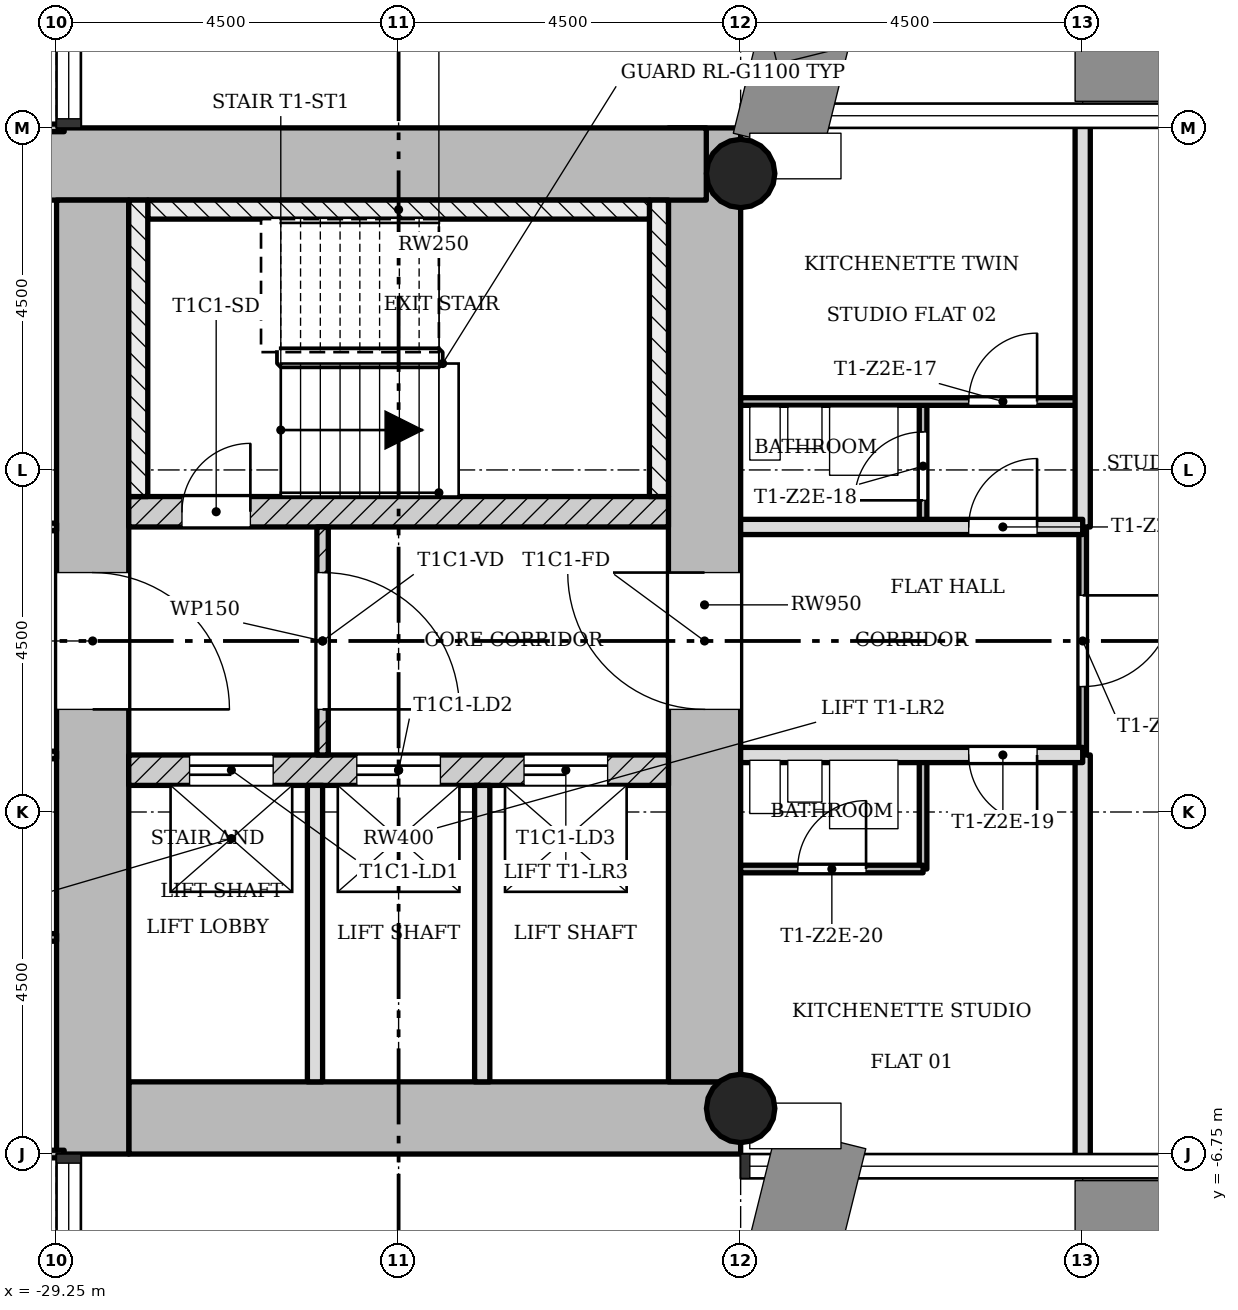
"""IFC4 building model, lengths in metres.
Left out: names, types, materials, properties, quantities, classifications, styles, units other than length and angle.
Written with IfcOpenShell. Run it as: python <this file> out.ifc"""

import sys

from ifc_helpers import new_model, si_unit, direction, frame, frame_2d, origin, origin_2d, place, context, subcontext, project, spatial, rectangle, hollow_circle, extrude, element, fill, save


model = new_model("IFC4")
c1 = context("Model", 3, precision=1e-05, world=origin(), true_north=direction((0.0, 1.0)))
c2 = subcontext(c1, "Body", "Model", "MODEL_VIEW")
j1 = project(units=[si_unit("LENGTHUNIT", "METRE"), si_unit("PLANEANGLEUNIT", "RADIAN")], contexts=[c1])
p1 = place(None, origin())
s1 = spatial("IfcSite", under=j1, at=p1, CompositionType="ELEMENT")
p2 = place(p1, origin())
s2 = spatial("IfcBuilding", under=s1, at=p2, CompositionType="ELEMENT")
p3 = place(p2, frame((0.0, 0.0, 100.4)))
s3 = spatial("IfcBuildingStorey", under=s2, at=p3, CompositionType="ELEMENT", Elevation=100.4)
p4 = place(p3, frame((-28.3, -6.275, 0.0), z_axis=(0.0, 0.0, 1.0), x_axis=(1.0, 0.0, 0.0)))
e1 = element("IfcWall", 1, at=p4, inside=s3, PredefinedType="SHEAR", context=c2, shape_type="SweptSolid", body=[
    extrude(rectangle(XDim=8.05, YDim=0.95, at=frame_2d((4.025, 0.0))), origin(), (0.0, 0.0, 1.0), 3.4),
])
p5 = place(p3, frame((-20.725, -5.8, 0.0), z_axis=(0.0, 0.0, 1.0), x_axis=(0.0, 1.0, 0.0)))
e2 = element("IfcWall", 2, at=p5, inside=s3, PredefinedType="SHEAR", context=c2, shape_type="SweptSolid", body=[
    extrude(rectangle(XDim=12.55, YDim=0.95, at=frame_2d((6.275, 0.0))), origin(), (0.0, 0.0, 1.0), 3.4),
])
p6 = place(p5, frame((4.9, 0.0, 0.0)))
e3 = element("IfcOpeningElement", 3, at=p6, cuts=e2, PredefinedType="OPENING", context=c2, shape_type="SweptSolid", body=[
    extrude(rectangle(XDim=1.8, YDim=2.1, at=frame_2d((0.9, 1.05))), frame((0.0, 0.485, 0.0), z_axis=(0.0, -1.0, 0.0), x_axis=(1.0, 0.0, 0.0)), (0.0, 0.0, 1.0), 0.97),
])
p7 = place(p3, frame((-20.702, 6.275, 0.0), z_axis=(0.0, 0.0, 1.0), x_axis=(-1.0, 0.0, 0.0)))
e4 = element("IfcWall", 4, at=p7, inside=s3, PredefinedType="SHEAR", context=c2, shape_type="SweptSolid", body=[
    extrude(rectangle(XDim=8.696, YDim=0.95, at=frame_2d((4.348, 0.0))), origin(), (0.0, 0.0, 1.0), 3.4),
])
p8 = place(p3, frame((-28.775, 5.8, 0.0), z_axis=(0.0, 0.0, 1.0), x_axis=(0.0, -1.0, 0.0)))
e5 = element("IfcWall", 5, at=p8, inside=s3, PredefinedType="SHEAR", context=c2, shape_type="SweptSolid", body=[
    extrude(rectangle(XDim=12.55, YDim=0.95, at=frame_2d((6.275, 0.0))), origin(), (0.0, 0.0, 1.0), 3.4),
])
p9 = place(p8, frame((4.9, 0.0, 0.0)))
e6 = element("IfcOpeningElement", 6, at=p9, cuts=e5, PredefinedType="OPENING", context=c2, shape_type="SweptSolid", body=[
    extrude(rectangle(XDim=1.8, YDim=2.1, at=frame_2d((0.9, 1.05))), frame((0.0, 0.485, 0.0), z_axis=(0.0, -1.0, 0.0), x_axis=(1.0, 0.0, 0.0)), (0.0, 0.0, 1.0), 0.97),
])
p10 = place(p3, frame((-28.3, -1.7, 0.0), z_axis=(0.0, 0.0, 1.0), x_axis=(1.0, 0.0, 0.0)))
e7 = element("IfcWall", 7, at=p10, inside=s3, PredefinedType="SHEAR", context=c2, shape_type="SweptSolid", body=[
    extrude(rectangle(XDim=7.1, YDim=0.4, at=frame_2d((3.55, 0.0))), origin(), (0.0, 0.0, 1.0), 3.4),
])
p11 = place(p10, frame((0.8, 0.0, 0.0)))
e8 = element("IfcOpeningElement", 8, at=p11, cuts=e7, PredefinedType="OPENING", context=c2, shape_type="SweptSolid", body=[
    extrude(rectangle(XDim=1.1, YDim=2.1, at=frame_2d((0.55, 1.05))), frame((0.0, 0.21, 0.0), z_axis=(0.0, -1.0, 0.0), x_axis=(1.0, 0.0, 0.0)), (0.0, 0.0, 1.0), 0.42),
])
p12 = place(p10, frame((3.0, 0.0, 0.0)))
e9 = element("IfcOpeningElement", 9, at=p12, cuts=e7, PredefinedType="OPENING", context=c2, shape_type="SweptSolid", body=[
    extrude(rectangle(XDim=1.1, YDim=2.1, at=frame_2d((0.55, 1.05))), frame((0.0, 0.21, 0.0), z_axis=(0.0, -1.0, 0.0), x_axis=(1.0, 0.0, 0.0)), (0.0, 0.0, 1.0), 0.42),
])
p13 = place(p10, frame((5.2, 0.0, 0.0)))
e10 = element("IfcOpeningElement", 10, at=p13, cuts=e7, PredefinedType="OPENING", context=c2, shape_type="SweptSolid", body=[
    extrude(rectangle(XDim=1.1, YDim=2.1, at=frame_2d((0.55, 1.05))), frame((0.0, 0.21, 0.0), z_axis=(0.0, -1.0, 0.0), x_axis=(1.0, 0.0, 0.0)), (0.0, 0.0, 1.0), 0.42),
])
p14 = place(p3, frame((-28.3, 1.7, 0.0), z_axis=(0.0, 0.0, 1.0), x_axis=(1.0, 0.0, 0.0)))
e11 = element("IfcWall", 11, at=p14, inside=s3, PredefinedType="SHEAR", context=c2, shape_type="SweptSolid", body=[
    extrude(rectangle(XDim=7.1, YDim=0.4, at=frame_2d((3.55, 0.0))), origin(), (0.0, 0.0, 1.0), 3.4),
])
p15 = place(p14, frame((0.7, 0.0, 0.0)))
e12 = element("IfcOpeningElement", 12, at=p15, cuts=e11, PredefinedType="OPENING", context=c2, shape_type="SweptSolid", body=[
    extrude(rectangle(XDim=0.9, YDim=2.1, at=frame_2d((0.45, 1.05))), frame((0.0, 0.21, 0.0), z_axis=(0.0, -1.0, 0.0), x_axis=(1.0, 0.0, 0.0)), (0.0, 0.0, 1.0), 0.42),
])
for number, where, z_axis, x_axis in (
    (13, (-20.25, -6.15, 0.0), (0.0, 0.0, 1.0), (1.0, 0.0, 0.0)),
    (14, (-20.25, 6.15, 0.0), (0.0, 0.0, 1.0), (1.0, 0.0, 0.0)),
):
    element("IfcColumn", number, at=place(p3, frame(where, z_axis=z_axis, x_axis=x_axis)), inside=s3, PredefinedType="COLUMN", context=c2, shape_type="SweptSolid", body=[
        extrude(hollow_circle(Radius=0.45, WallThickness=0.032, at=origin_2d()), origin(), (0.0, 0.0, 1.0), 3.4),
    ])
p16 = place(p3, frame((-25.75, -1.5, 0.0), z_axis=(0.0, 0.0, 1.0), x_axis=(0.0, 1.0, 0.0)))
e15 = element("IfcWall", 15, at=p16, inside=s3, PredefinedType="PARTITIONING", context=c2, shape_type="SweptSolid", body=[
    extrude(rectangle(XDim=3.0, YDim=0.15, at=frame_2d((1.5, 0.0))), origin(), (0.0, 0.0, 1.0), 3.0),
])
p17 = place(p16, frame((0.6, 0.0, 0.0)))
e16 = element("IfcOpeningElement", 16, at=p17, cuts=e15, PredefinedType="OPENING", context=c2, shape_type="SweptSolid", body=[
    extrude(rectangle(XDim=1.8, YDim=2.1, at=frame_2d((0.9, 1.05))), frame((0.0, 0.085, 0.0), z_axis=(0.0, -1.0, 0.0), x_axis=(1.0, 0.0, 0.0)), (0.0, 0.0, 1.0), 0.17),
])
for number, where, z_axis, x_axis in (
    (17, (-25.85, -5.8, 0.0), (0.0, 0.0, 1.0), (0.0, 1.0, 0.0)),
    (18, (-23.65, -5.8, 0.0), (0.0, 0.0, 1.0), (0.0, 1.0, 0.0)),
):
    element("IfcWall", number, at=place(p3, frame(where, z_axis=z_axis, x_axis=x_axis)), inside=s3, PredefinedType="SOLIDWALL", context=c2, shape_type="SweptSolid", body=[
        extrude(rectangle(XDim=3.9, YDim=0.2, at=frame_2d((1.95, 0.0))), origin(), (0.0, 0.0, 1.0), 3.0),
    ])
p18 = place(p3, frame((-17.85, -3.0, 0.0), z_axis=(0.0, 0.0, 1.0), x_axis=(0.0, 1.0, 0.0)))
e19 = element("IfcWall", 19, at=p18, inside=s3, PredefinedType="PARTITIONING", context=c2, shape_type="SweptSolid", body=[
    extrude(rectangle(XDim=1.5, YDim=0.1, at=frame_2d((0.75, 0.0))), origin(), (0.0, 0.0, 1.0), 3.0),
])
p19 = place(p3, frame((-17.85, 1.5, 0.0), z_axis=(0.0, 0.0, 1.0), x_axis=(0.0, 1.0, 0.0)))
e20 = element("IfcWall", 20, at=p19, inside=s3, PredefinedType="PARTITIONING", context=c2, shape_type="SweptSolid", body=[
    extrude(rectangle(XDim=1.65, YDim=0.1, at=frame_2d((0.825, 0.0))), origin(), (0.0, 0.0, 1.0), 3.0),
])
p20 = place(p19, frame((0.35, 0.0, 0.0)))
e21 = element("IfcOpeningElement", 21, at=p20, cuts=e20, PredefinedType="OPENING", context=c2, shape_type="SweptSolid", body=[
    extrude(rectangle(XDim=0.9, YDim=2.1, at=frame_2d((0.45, 1.05))), frame((0.0, 0.06, 0.0), z_axis=(0.0, -1.0, 0.0), x_axis=(1.0, 0.0, 0.0)), (0.0, 0.0, 1.0), 0.12),
])
p21 = place(p3, frame((-15.75, -1.5, 0.0), z_axis=(0.0, 0.0, 1.0), x_axis=(0.0, 1.0, 0.0)))
e22 = element("IfcWall", 22, at=p21, inside=s3, PredefinedType="PARTITIONING", context=c2, shape_type="SweptSolid", body=[
    extrude(rectangle(XDim=3.0, YDim=0.1, at=frame_2d((1.5, 0.0))), origin(), (0.0, 0.0, 1.0), 3.0),
])
p22 = place(p21, frame((0.9, 0.0, 0.0)))
e23 = element("IfcOpeningElement", 23, at=p22, cuts=e22, PredefinedType="OPENING", context=c2, shape_type="SweptSolid", body=[
    extrude(rectangle(XDim=1.2, YDim=2.1, at=frame_2d((0.6, 1.05))), frame((0.0, 0.06, 0.0), z_axis=(0.0, -1.0, 0.0), x_axis=(1.0, 0.0, 0.0)), (0.0, 0.0, 1.0), 0.12),
])
for number, where, z_axis, x_axis in (
    (24, (-15.75, -6.85, 0.0), (0.0, 0.0, 1.0), (0.0, 1.0, 0.0)),
    (25, (-15.75, 1.5, 0.0), (0.0, 0.0, 1.0), (0.0, 1.0, 0.0)),
):
    element("IfcWall", number, at=place(p3, frame(where, z_axis=z_axis, x_axis=x_axis)), inside=s3, PredefinedType="SOLIDWALL", context=c2, shape_type="SweptSolid", body=[
        extrude(rectangle(XDim=5.35, YDim=0.2, at=frame_2d((2.675, 0.0))), origin(), (0.0, 0.0, 1.0), 3.0),
    ])
p23 = place(p3, frame((-35.1, -6.75, 0.0), z_axis=(0.0, 0.0, 1.0), x_axis=(1.0, 0.0, 0.0)))
e26 = element("IfcWall", 26, at=p23, inside=s3, PredefinedType="PARTITIONING", context=c2, shape_type="SweptSolid", body=[
    extrude(rectangle(XDim=5.95, YDim=0.1, at=frame_2d((2.975, 0.0))), origin(), (0.0, 0.0, 1.0), 3.0),
])
p24 = place(p3, frame((-35.1, -3.9, 0.0), z_axis=(0.0, 0.0, 1.0), x_axis=(1.0, 0.0, 0.0)))
e27 = element("IfcWall", 27, at=p24, inside=s3, PredefinedType="PARTITIONING", context=c2, shape_type="SweptSolid", body=[
    extrude(rectangle(XDim=5.85, YDim=0.1, at=frame_2d((2.925, 0.0))), origin(), (0.0, 0.0, 1.0), 3.0),
])
p25 = place(p3, frame((-20.25, -3.0, 0.0), z_axis=(0.0, 0.0, 1.0), x_axis=(1.0, 0.0, 0.0)))
e28 = element("IfcWall", 28, at=p25, inside=s3, PredefinedType="PARTITIONING", context=c2, shape_type="SweptSolid", body=[
    extrude(rectangle(XDim=2.4, YDim=0.1, at=frame_2d((1.2, 0.0))), origin(), (0.0, 0.0, 1.0), 3.0),
])
p26 = place(p25, frame((0.75, 0.0, 0.0)))
e29 = element("IfcOpeningElement", 29, at=p26, cuts=e28, PredefinedType="OPENING", context=c2, shape_type="SweptSolid", body=[
    extrude(rectangle(XDim=0.9, YDim=2.1, at=frame_2d((0.45, 1.05))), frame((0.0, 0.06, 0.0), z_axis=(0.0, -1.0, 0.0), x_axis=(1.0, 0.0, 0.0)), (0.0, 0.0, 1.0), 0.12),
])
p27 = place(p3, frame((-35.1, -1.5, 0.0), z_axis=(0.0, 0.0, 1.0), x_axis=(1.0, 0.0, 0.0)))
e30 = element("IfcWall", 30, at=p27, inside=s3, PredefinedType="PARTITIONING", context=c2, shape_type="SweptSolid", body=[
    extrude(rectangle(XDim=5.85, YDim=0.1, at=frame_2d((2.925, 0.0))), origin(), (0.0, 0.0, 1.0), 3.0),
])
p28 = place(p27, frame((3.375, 0.0, 0.0)))
e31 = element("IfcOpeningElement", 31, at=p28, cuts=e30, PredefinedType="OPENING", context=c2, shape_type="SweptSolid", body=[
    extrude(rectangle(XDim=0.9, YDim=2.1, at=frame_2d((0.45, 1.05))), frame((0.0, 0.06, 0.0), z_axis=(0.0, -1.0, 0.0), x_axis=(1.0, 0.0, 0.0)), (0.0, 0.0, 1.0), 0.12),
])
p29 = place(p3, frame((-20.25, -1.5, 0.0), z_axis=(0.0, 0.0, 1.0), x_axis=(1.0, 0.0, 0.0)))
e32 = element("IfcWall", 32, at=p29, inside=s3, PredefinedType="SOLIDWALL", context=c2, shape_type="SweptSolid", body=[
    extrude(rectangle(XDim=4.5, YDim=0.2, at=frame_2d((2.25, 0.0))), origin(), (0.0, 0.0, 1.0), 3.0),
])
p30 = place(p29, frame((3.0, 0.0, 0.0)))
e33 = element("IfcOpeningElement", 33, at=p30, cuts=e32, PredefinedType="OPENING", context=c2, shape_type="SweptSolid", body=[
    extrude(rectangle(XDim=0.9, YDim=2.1, at=frame_2d((0.45, 1.05))), frame((0.0, 0.11, 0.0), z_axis=(0.0, -1.0, 0.0), x_axis=(1.0, 0.0, 0.0)), (0.0, 0.0, 1.0), 0.22),
])
p31 = place(p3, frame((-35.1, 1.5, 0.0), z_axis=(0.0, 0.0, 1.0), x_axis=(1.0, 0.0, 0.0)))
e34 = element("IfcWall", 34, at=p31, inside=s3, PredefinedType="PARTITIONING", context=c2, shape_type="SweptSolid", body=[
    extrude(rectangle(XDim=5.85, YDim=0.1, at=frame_2d((2.925, 0.0))), origin(), (0.0, 0.0, 1.0), 3.0),
])
p32 = place(p31, frame((3.675, 0.0, 0.0)))
e35 = element("IfcOpeningElement", 35, at=p32, cuts=e34, PredefinedType="OPENING", context=c2, shape_type="SweptSolid", body=[
    extrude(rectangle(XDim=0.9, YDim=2.1, at=frame_2d((0.45, 1.05))), frame((0.0, 0.06, 0.0), z_axis=(0.0, -1.0, 0.0), x_axis=(1.0, 0.0, 0.0)), (0.0, 0.0, 1.0), 0.12),
])
p33 = place(p3, frame((-20.25, 1.5, 0.0), z_axis=(0.0, 0.0, 1.0), x_axis=(1.0, 0.0, 0.0)))
e36 = element("IfcWall", 36, at=p33, inside=s3, PredefinedType="SOLIDWALL", context=c2, shape_type="SweptSolid", body=[
    extrude(rectangle(XDim=4.5, YDim=0.2, at=frame_2d((2.25, 0.0))), origin(), (0.0, 0.0, 1.0), 3.0),
])
p34 = place(p33, frame((3.0, 0.0, 0.0)))
e37 = element("IfcOpeningElement", 37, at=p34, cuts=e36, PredefinedType="OPENING", context=c2, shape_type="SweptSolid", body=[
    extrude(rectangle(XDim=0.9, YDim=2.1, at=frame_2d((0.45, 1.05))), frame((0.0, 0.11, 0.0), z_axis=(0.0, -1.0, 0.0), x_axis=(1.0, 0.0, 0.0)), (0.0, 0.0, 1.0), 0.22),
])
p35 = place(p3, frame((-20.25, 3.15, 0.0), z_axis=(0.0, 0.0, 1.0), x_axis=(1.0, 0.0, 0.0)))
e38 = element("IfcWall", 38, at=p35, inside=s3, PredefinedType="PARTITIONING", context=c2, shape_type="SweptSolid", body=[
    extrude(rectangle(XDim=4.5, YDim=0.1, at=frame_2d((2.25, 0.0))), origin(), (0.0, 0.0, 1.0), 3.0),
])
p36 = place(p35, frame((3.0, 0.0, 0.0)))
e39 = element("IfcOpeningElement", 39, at=p36, cuts=e38, PredefinedType="OPENING", context=c2, shape_type="SweptSolid", body=[
    extrude(rectangle(XDim=0.9, YDim=2.1, at=frame_2d((0.45, 1.05))), frame((0.0, 0.06, 0.0), z_axis=(0.0, -1.0, 0.0), x_axis=(1.0, 0.0, 0.0)), (0.0, 0.0, 1.0), 0.12),
])
p37 = place(p3, frame((-35.1, 6.75, 0.0), z_axis=(0.0, 0.0, 1.0), x_axis=(1.0, 0.0, 0.0)))
e40 = element("IfcWall", 40, at=p37, inside=s3, PredefinedType="PARTITIONING", context=c2, shape_type="SweptSolid", body=[
    extrude(rectangle(XDim=5.95, YDim=0.1, at=frame_2d((2.975, 0.0))), origin(), (0.0, 0.0, 1.0), 3.0),
])
p38 = place(p3, frame((-21.325, 1.9, 0.0), z_axis=(0.0, 0.0, 1.0), x_axis=(0.0, 1.0, 0.0)))
e41 = element("IfcWall", 41, at=p38, inside=s3, PredefinedType="SHEAR", context=c2, shape_type="SweptSolid", body=[
    extrude(rectangle(XDim=3.9, YDim=0.25, at=frame_2d((1.95, 0.0))), origin(), (0.0, 0.0, 1.0), 3.4),
])
p39 = place(p3, frame((-28.05, 5.675, 0.0), z_axis=(0.0, 0.0, 1.0), x_axis=(1.0, 0.0, 0.0)))
e42 = element("IfcWall", 42, at=p39, inside=s3, PredefinedType="SHEAR", context=c2, shape_type="SweptSolid", body=[
    extrude(rectangle(XDim=6.6, YDim=0.25, at=frame_2d((3.3, 0.0))), origin(), (0.0, 0.0, 1.0), 3.4),
])
p40 = place(p3, frame((-28.175, 1.9, 0.0), z_axis=(0.0, 0.0, 1.0), x_axis=(0.0, 1.0, 0.0)))
e43 = element("IfcWall", 43, at=p40, inside=s3, PredefinedType="SHEAR", context=c2, shape_type="SweptSolid", body=[
    extrude(rectangle(XDim=3.9, YDim=0.25, at=frame_2d((1.95, 0.0))), origin(), (0.0, 0.0, 1.0), 3.4),
])
p41 = place(p17, origin())
e44 = element("IfcDoor", 44, at=p41, inside=s3, OperationType="SINGLE_SWING_LEFT", PredefinedType="DOOR", context=c2, shape_type="SweptSolid", body=[
    extrude(rectangle(XDim=1.8, YDim=2.1, at=frame_2d((0.9, 1.05))), frame((0.0, 0.025, 0.0), z_axis=(0.0, -1.0, 0.0), x_axis=(1.0, 0.0, 0.0)), (0.0, 0.0, 1.0), 0.05),
])
fill(e16, e44)
p42 = place(p34, origin())
e45 = element("IfcDoor", 45, at=p42, inside=s3, OperationType="SINGLE_SWING_LEFT", PredefinedType="DOOR", context=c2, shape_type="SweptSolid", body=[
    extrude(rectangle(XDim=0.9, YDim=2.1, at=frame_2d((0.45, 1.05))), frame((0.0, 0.025, 0.0), z_axis=(0.0, -1.0, 0.0), x_axis=(1.0, 0.0, 0.0)), (0.0, 0.0, 1.0), 0.05),
])
fill(e37, e45)
p43 = place(p36, origin())
e46 = element("IfcDoor", 46, at=p43, inside=s3, OperationType="SINGLE_SWING_LEFT", PredefinedType="DOOR", context=c2, shape_type="SweptSolid", body=[
    extrude(rectangle(XDim=0.9, YDim=2.1, at=frame_2d((0.45, 1.05))), frame((0.0, 0.025, 0.0), z_axis=(0.0, -1.0, 0.0), x_axis=(1.0, 0.0, 0.0)), (0.0, 0.0, 1.0), 0.05),
])
fill(e39, e46)
p44 = place(p20, origin())
e47 = element("IfcDoor", 47, at=p44, inside=s3, OperationType="SINGLE_SWING_RIGHT", PredefinedType="DOOR", context=c2, shape_type="SweptSolid", body=[
    extrude(rectangle(XDim=0.9, YDim=2.1, at=frame_2d((0.45, 1.05))), frame((0.0, 0.025, 0.0), z_axis=(0.0, -1.0, 0.0), x_axis=(1.0, 0.0, 0.0)), (0.0, 0.0, 1.0), 0.05),
])
fill(e21, e47)
p45 = place(p30, origin())
e48 = element("IfcDoor", 48, at=p45, inside=s3, OperationType="SINGLE_SWING_RIGHT", PredefinedType="DOOR", context=c2, shape_type="SweptSolid", body=[
    extrude(rectangle(XDim=0.9, YDim=2.1, at=frame_2d((0.45, 1.05))), frame((0.0, 0.025, 0.0), z_axis=(0.0, -1.0, 0.0), x_axis=(1.0, 0.0, 0.0)), (0.0, 0.0, 1.0), 0.05),
])
fill(e33, e48)
p46 = place(p26, origin())
e49 = element("IfcDoor", 49, at=p46, inside=s3, OperationType="SINGLE_SWING_LEFT", PredefinedType="DOOR", context=c2, shape_type="SweptSolid", body=[
    extrude(rectangle(XDim=0.9, YDim=2.1, at=frame_2d((0.45, 1.05))), frame((0.0, 0.025, 0.0), z_axis=(0.0, -1.0, 0.0), x_axis=(1.0, 0.0, 0.0)), (0.0, 0.0, 1.0), 0.05),
])
fill(e29, e49)
p47 = place(p22, origin())
e50 = element("IfcDoor", 50, at=p47, inside=s3, OperationType="SINGLE_SWING_RIGHT", PredefinedType="DOOR", context=c2, shape_type="SweptSolid", body=[
    extrude(rectangle(XDim=1.2, YDim=2.1, at=frame_2d((0.6, 1.05))), frame((0.0, 0.025, 0.0), z_axis=(0.0, -1.0, 0.0), x_axis=(1.0, 0.0, 0.0)), (0.0, 0.0, 1.0), 0.05),
])
fill(e23, e50)
p48 = place(p15, origin())
e51 = element("IfcDoor", 51, at=p48, inside=s3, OperationType="SINGLE_SWING_LEFT", PredefinedType="DOOR", context=c2, shape_type="SweptSolid", body=[
    extrude(rectangle(XDim=0.9, YDim=2.1, at=frame_2d((0.45, 1.05))), frame((0.0, 0.025, 0.0), z_axis=(0.0, -1.0, 0.0), x_axis=(1.0, 0.0, 0.0)), (0.0, 0.0, 1.0), 0.05),
])
fill(e12, e51)
p49 = place(p11, origin())
e52 = element("IfcDoor", 52, at=p49, inside=s3, OperationType="SLIDING_TO_LEFT", PredefinedType="DOOR", context=c2, shape_type="SweptSolid", body=[
    extrude(rectangle(XDim=1.1, YDim=2.1, at=frame_2d((0.55, 1.05))), frame((0.0, 0.025, 0.0), z_axis=(0.0, -1.0, 0.0), x_axis=(1.0, 0.0, 0.0)), (0.0, 0.0, 1.0), 0.05),
])
fill(e8, e52)
p50 = place(p12, origin())
e53 = element("IfcDoor", 53, at=p50, inside=s3, OperationType="SLIDING_TO_LEFT", PredefinedType="DOOR", context=c2, shape_type="SweptSolid", body=[
    extrude(rectangle(XDim=1.1, YDim=2.1, at=frame_2d((0.55, 1.05))), frame((0.0, 0.025, 0.0), z_axis=(0.0, -1.0, 0.0), x_axis=(1.0, 0.0, 0.0)), (0.0, 0.0, 1.0), 0.05),
])
fill(e9, e53)
p51 = place(p13, origin())
e54 = element("IfcDoor", 54, at=p51, inside=s3, OperationType="SLIDING_TO_LEFT", PredefinedType="DOOR", context=c2, shape_type="SweptSolid", body=[
    extrude(rectangle(XDim=1.1, YDim=2.1, at=frame_2d((0.55, 1.05))), frame((0.0, 0.025, 0.0), z_axis=(0.0, -1.0, 0.0), x_axis=(1.0, 0.0, 0.0)), (0.0, 0.0, 1.0), 0.05),
])
fill(e10, e54)
p52 = place(p9, origin())
e55 = element("IfcDoor", 55, at=p52, inside=s3, OperationType="SINGLE_SWING_LEFT", PredefinedType="DOOR", context=c2, shape_type="SweptSolid", body=[
    extrude(rectangle(XDim=1.8, YDim=2.1, at=frame_2d((0.9, 1.05))), frame((0.0, 0.025, 0.0), z_axis=(0.0, -1.0, 0.0), x_axis=(1.0, 0.0, 0.0)), (0.0, 0.0, 1.0), 0.05),
])
fill(e6, e55)
p53 = place(p6, origin())
e56 = element("IfcDoor", 56, at=p53, inside=s3, OperationType="SINGLE_SWING_LEFT", PredefinedType="DOOR", context=c2, shape_type="SweptSolid", body=[
    extrude(rectangle(XDim=1.8, YDim=2.1, at=frame_2d((0.9, 1.05))), frame((0.0, 0.025, 0.0), z_axis=(0.0, -1.0, 0.0), x_axis=(1.0, 0.0, 0.0)), (0.0, 0.0, 1.0), 0.05),
])
fill(e3, e56)
save(model, sys.argv[1])
